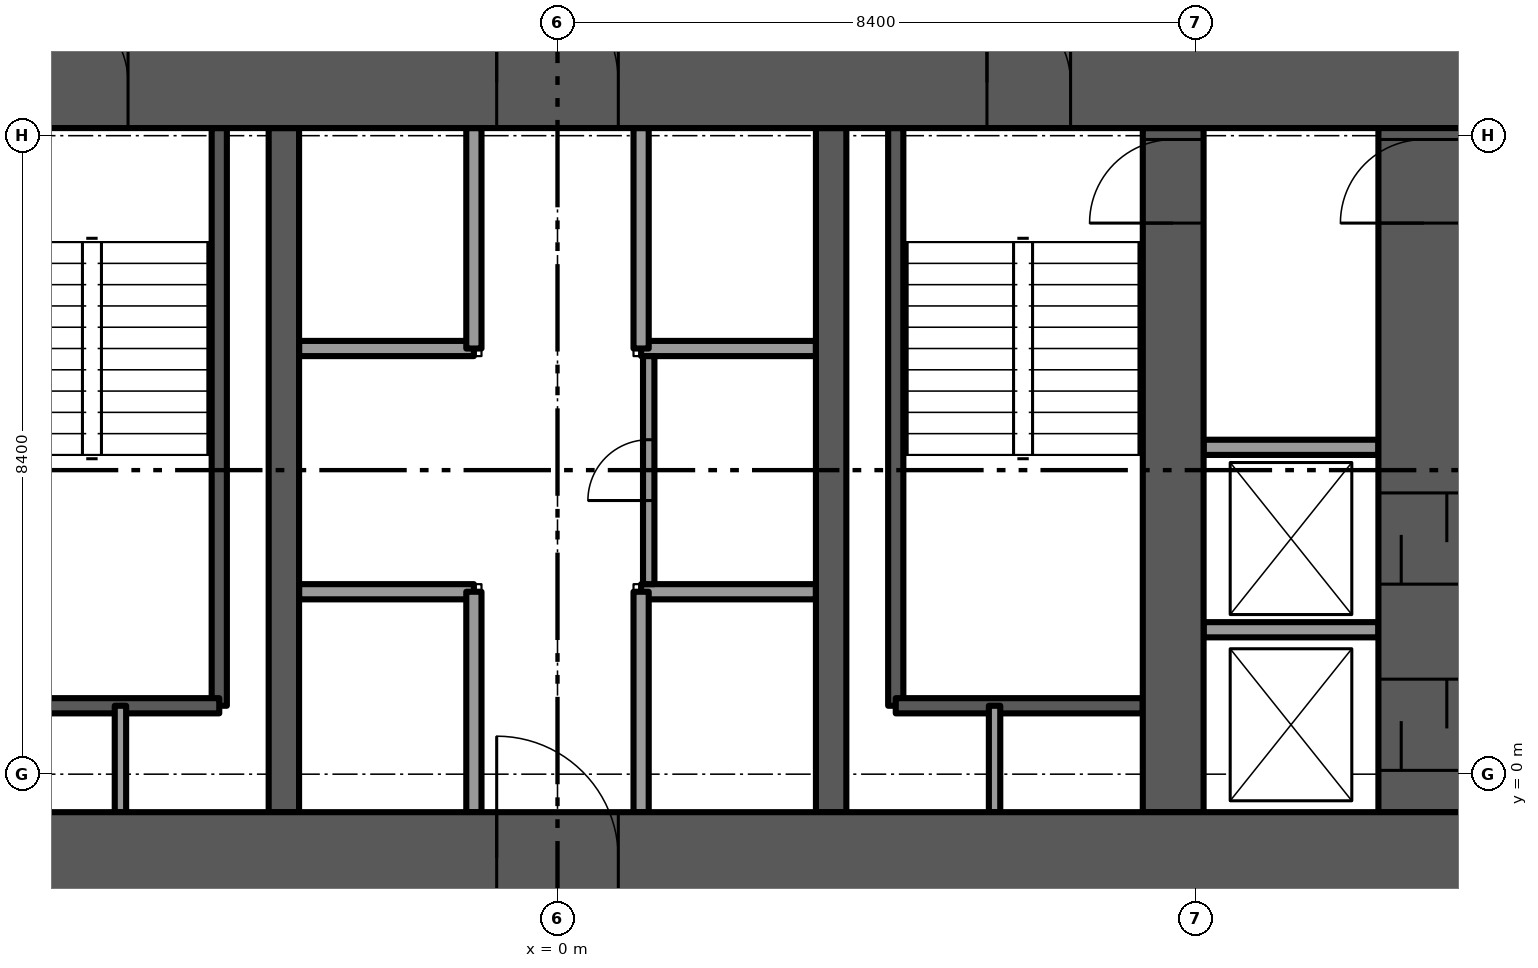
"""IFC4 building model, lengths in metres.
Left out: names, types, materials, properties, quantities, classifications, styles, units other than length and angle.
Written with IfcOpenShell. Run it as: python <this file> out.ifc"""

import sys

from ifc_helpers import new_model, si_unit, direction, frame, frame_2d, origin, place, context, subcontext, project, spatial, rectangle, extrude, element, fill, save


model = new_model("IFC4")
c1 = context("Model", 3, precision=1e-05, world=origin(), true_north=direction((0.0, 1.0)))
c2 = subcontext(c1, "Body", "Model", "MODEL_VIEW")
j1 = project(units=[si_unit("LENGTHUNIT", "METRE"), si_unit("PLANEANGLEUNIT", "RADIAN")], contexts=[c1])
p1 = place(None, origin())
s1 = spatial("IfcSite", under=j1, at=p1, CompositionType="ELEMENT")
p2 = place(p1, origin())
s2 = spatial("IfcBuilding", under=s1, at=p2, CompositionType="ELEMENT")
p3 = place(p2, frame((0.0, 0.0, 28.0)))
s3 = spatial("IfcBuildingStorey", under=s2, at=p3, CompositionType="ELEMENT", Elevation=28.0)
p4 = place(p3, frame((-12.0, -1.1, -0.3), z_axis=(0.0, 0.0, 1.0), x_axis=(1.0, 0.0, 0.0)))
e1 = element("IfcWall", 1, at=p4, inside=s3, PredefinedType="SHEAR", context=c2, shape_type="SweptSolid", body=[
    extrude(rectangle(XDim=24.0, YDim=1.2, at=frame_2d((12.0, 0.0))), origin(), (0.0, 0.0, 1.0), 3.75),
])
p5 = place(p4, frame((11.2, 0.0, 0.0)))
e2 = element("IfcOpeningElement", 2, at=p5, cuts=e1, PredefinedType="OPENING", context=c2, shape_type="SweptSolid", body=[
    extrude(rectangle(XDim=1.6, YDim=2.1, at=frame_2d((0.8, 1.05))), frame((0.0, 0.6, 0.0), z_axis=(0.0, -1.0, 0.0), x_axis=(1.0, 0.0, 0.0)), (0.0, 0.0, 1.0), 1.2),
])
p6 = place(p3, frame((-12.0, 9.1, -0.3), z_axis=(0.0, 0.0, 1.0), x_axis=(1.0, 0.0, 0.0)))
e3 = element("IfcWall", 3, at=p6, inside=s3, PredefinedType="SHEAR", context=c2, shape_type="SweptSolid", body=[
    extrude(rectangle(XDim=24.0, YDim=1.2, at=frame_2d((12.0, 0.0))), origin(), (0.0, 0.0, 1.0), 3.75),
])
p7 = place(p6, frame((11.2, 0.0, 0.0)))
e4 = element("IfcOpeningElement", 4, at=p7, cuts=e3, PredefinedType="OPENING", context=c2, shape_type="SweptSolid", body=[
    extrude(rectangle(XDim=1.6, YDim=2.1, at=frame_2d((0.8, 1.05))), frame((0.0, 0.6, 0.0), z_axis=(0.0, -1.0, 0.0), x_axis=(1.0, 0.0, 0.0)), (0.0, 0.0, 1.0), 1.2),
])
p8 = place(p6, frame((5.25, 0.0, 0.0)))
e5 = element("IfcOpeningElement", 5, at=p8, cuts=e3, PredefinedType="OPENING", context=c2, shape_type="SweptSolid", body=[
    extrude(rectangle(XDim=1.1, YDim=2.1, at=frame_2d((0.55, 1.05))), frame((0.0, 0.6, 0.0), z_axis=(0.0, -1.0, 0.0), x_axis=(1.0, 0.0, 0.0)), (0.0, 0.0, 1.0), 1.2),
])
p9 = place(p6, frame((17.65, 0.0, 0.0)))
e6 = element("IfcOpeningElement", 6, at=p9, cuts=e3, PredefinedType="OPENING", context=c2, shape_type="SweptSolid", body=[
    extrude(rectangle(XDim=1.1, YDim=2.1, at=frame_2d((0.55, 1.05))), frame((0.0, 0.6, 0.0), z_axis=(0.0, -1.0, 0.0), x_axis=(1.0, 0.0, 0.0)), (0.0, 0.0, 1.0), 1.2),
])
p10 = place(p3, frame((8.1, -0.5, -0.3), z_axis=(0.0, 0.0, 1.0), x_axis=(0.0, 1.0, 0.0)))
e7 = element("IfcWall", 7, at=p10, inside=s3, PredefinedType="SHEAR", context=c2, shape_type="SweptSolid", body=[
    extrude(rectangle(XDim=9.0, YDim=0.8, at=frame_2d((4.5, 0.0))), origin(), (0.0, 0.0, 1.0), 3.75),
])
p11 = place(p10, frame((7.75, 0.0, 0.0)))
e8 = element("IfcOpeningElement", 8, at=p11, cuts=e7, PredefinedType="OPENING", context=c2, shape_type="SweptSolid", body=[
    extrude(rectangle(XDim=1.1, YDim=2.1, at=frame_2d((0.55, 1.05))), frame((0.0, 0.4, 0.0), z_axis=(0.0, -1.0, 0.0), x_axis=(1.0, 0.0, 0.0)), (0.0, 0.0, 1.0), 0.8),
])
for number, where, z_axis, x_axis in (
    (9, (-3.6, -0.5, -0.3), (0.0, 0.0, 1.0), (0.0, 1.0, 0.0)),
    (10, (3.6, -0.5, -0.3), (0.0, 0.0, 1.0), (0.0, 1.0, 0.0)),
):
    element("IfcWall", number, at=place(p3, frame(where, z_axis=z_axis, x_axis=x_axis)), inside=s3, PredefinedType="SHEAR", context=c2, shape_type="SweptSolid", body=[
        extrude(rectangle(XDim=9.0, YDim=0.4, at=frame_2d((4.5, 0.0))), origin(), (0.0, 0.0, 1.0), 3.75),
    ])
p12 = place(p3, frame((11.4, -0.5, -0.3), z_axis=(0.0, 0.0, 1.0), x_axis=(0.0, 1.0, 0.0)))
e11 = element("IfcWall", 11, at=p12, inside=s3, PredefinedType="SHEAR", context=c2, shape_type="SweptSolid", body=[
    extrude(rectangle(XDim=9.0, YDim=1.2, at=frame_2d((4.5, 0.0))), origin(), (0.0, 0.0, 1.0), 3.75),
])
p13 = place(p12, frame((7.75, 0.0, 0.0)))
e12 = element("IfcOpeningElement", 12, at=p13, cuts=e11, PredefinedType="OPENING", context=c2, shape_type="SweptSolid", body=[
    extrude(rectangle(XDim=1.1, YDim=2.1, at=frame_2d((0.55, 1.05))), frame((0.0, 0.6, 0.0), z_axis=(0.0, -1.0, 0.0), x_axis=(1.0, 0.0, 0.0)), (0.0, 0.0, 1.0), 1.2),
])
p14 = place(p12, frame((0.55, 0.0, 0.0)))
e13 = element("IfcOpeningElement", 13, at=p14, cuts=e11, PredefinedType="OPENING", context=c2, shape_type="SweptSolid", body=[
    extrude(rectangle(XDim=1.2, YDim=2.1, at=frame_2d((0.6, 1.05))), frame((0.0, 0.6, 0.0), z_axis=(0.0, -1.0, 0.0), x_axis=(1.0, 0.0, 0.0)), (0.0, 0.0, 1.0), 1.2),
])
p15 = place(p12, frame((3.0, 0.0, 0.0)))
e14 = element("IfcOpeningElement", 14, at=p15, cuts=e11, PredefinedType="OPENING", context=c2, shape_type="SweptSolid", body=[
    extrude(rectangle(XDim=1.2, YDim=2.1, at=frame_2d((0.6, 1.05))), frame((0.0, 0.6, 0.0), z_axis=(0.0, -1.0, 0.0), x_axis=(1.0, 0.0, 0.0)), (0.0, 0.0, 1.0), 1.2),
])
p16 = place(p3, frame((10.945, -17.893, 0.0), z_axis=(0.0, 0.0, 1.0), x_axis=(0.500003237297, 0.866023534722, 0.0)))
e15 = element("IfcWall", 15, at=p16, inside=s3, PredefinedType="SOLIDWALL", context=c2, shape_type="SweptSolid", body=[
    extrude(rectangle(XDim=20.046, YDim=0.15, at=frame_2d((10.023, 0.0))), origin(), (0.0, 0.0, 1.0), 3.45),
])
p17 = place(p16, frame((1.923, 0.0, 0.15)))
e16 = element("IfcOpeningElement", 16, at=p17, cuts=e15, PredefinedType="OPENING", context=c2, shape_type="SweptSolid", body=[
    extrude(rectangle(XDim=1.8, YDim=2.85, at=frame_2d((0.9, 1.425))), frame((0.0, 0.075, 0.0), z_axis=(0.0, -1.0, 0.0), x_axis=(1.0, 0.0, 0.0)), (0.0, 0.0, 1.0), 0.15),
])
p18 = place(p16, frame((4.023, 0.0, 0.0)))
e17 = element("IfcOpeningElement", 17, at=p18, cuts=e15, PredefinedType="OPENING", context=c2, shape_type="SweptSolid", body=[
    extrude(rectangle(XDim=1.5, YDim=2.4, at=frame_2d((0.75, 1.2))), frame((0.0, 0.075, 0.0), z_axis=(0.0, -1.0, 0.0), x_axis=(1.0, 0.0, 0.0)), (0.0, 0.0, 1.0), 0.15),
])
p19 = place(p16, frame((6.123, 0.0, 0.15)))
e18 = element("IfcOpeningElement", 18, at=p19, cuts=e15, PredefinedType="OPENING", context=c2, shape_type="SweptSolid", body=[
    extrude(rectangle(XDim=1.8, YDim=2.85, at=frame_2d((0.9, 1.425))), frame((0.0, 0.075, 0.0), z_axis=(0.0, -1.0, 0.0), x_axis=(1.0, 0.0, 0.0)), (0.0, 0.0, 1.0), 0.15),
])
p20 = place(p16, frame((8.223, 0.0, 0.0)))
e19 = element("IfcOpeningElement", 19, at=p20, cuts=e15, PredefinedType="OPENING", context=c2, shape_type="SweptSolid", body=[
    extrude(rectangle(XDim=1.5, YDim=2.4, at=frame_2d((0.75, 1.2))), frame((0.0, 0.075, 0.0), z_axis=(0.0, -1.0, 0.0), x_axis=(1.0, 0.0, 0.0)), (0.0, 0.0, 1.0), 0.15),
])
p21 = place(p16, frame((10.323, 0.0, 0.15)))
e20 = element("IfcOpeningElement", 20, at=p21, cuts=e15, PredefinedType="OPENING", context=c2, shape_type="SweptSolid", body=[
    extrude(rectangle(XDim=1.8, YDim=2.85, at=frame_2d((0.9, 1.425))), frame((0.0, 0.075, 0.0), z_axis=(0.0, -1.0, 0.0), x_axis=(1.0, 0.0, 0.0)), (0.0, 0.0, 1.0), 0.15),
])
p22 = place(p16, frame((12.423, 0.0, 0.0)))
e21 = element("IfcOpeningElement", 21, at=p22, cuts=e15, PredefinedType="OPENING", context=c2, shape_type="SweptSolid", body=[
    extrude(rectangle(XDim=1.5, YDim=2.4, at=frame_2d((0.75, 1.2))), frame((0.0, 0.075, 0.0), z_axis=(0.0, -1.0, 0.0), x_axis=(1.0, 0.0, 0.0)), (0.0, 0.0, 1.0), 0.15),
])
p23 = place(p16, frame((14.523, 0.0, 0.15)))
e22 = element("IfcOpeningElement", 22, at=p23, cuts=e15, PredefinedType="OPENING", context=c2, shape_type="SweptSolid", body=[
    extrude(rectangle(XDim=0.9, YDim=2.85, at=frame_2d((0.45, 1.425))), frame((0.0, 0.075, 0.0), z_axis=(0.0, -1.0, 0.0), x_axis=(1.0, 0.0, 0.0)), (0.0, 0.0, 1.0), 0.15),
])
p24 = place(p16, frame((0.311, 0.0, 0.15)))
e23 = element("IfcOpeningElement", 23, at=p24, cuts=e15, PredefinedType="OPENING", context=c2, shape_type="SweptSolid", body=[
    extrude(rectangle(XDim=0.9, YDim=2.73, at=frame_2d((0.45, 1.365))), frame((0.0, 0.075, 0.0), z_axis=(0.0, -1.0, 0.0), x_axis=(1.0, 0.0, 0.0)), (0.0, 0.0, 1.0), 0.15),
])
p25 = place(p16, frame((18.834, 0.0, 0.15)))
e24 = element("IfcOpeningElement", 24, at=p25, cuts=e15, PredefinedType="OPENING", context=c2, shape_type="SweptSolid", body=[
    extrude(rectangle(XDim=0.9, YDim=2.73, at=frame_2d((0.45, 1.365))), frame((0.0, 0.075, 0.0), z_axis=(0.0, -1.0, 0.0), x_axis=(1.0, 0.0, 0.0)), (0.0, 0.0, 1.0), 0.15),
])
p26 = place(p3, frame((20.968, 0.532, 0.0), z_axis=(0.0, 0.0, 1.0), x_axis=(-0.500000010132, 0.866025397935, 0.0)))
e25 = element("IfcWall", 25, at=p26, inside=s3, PredefinedType="SOLIDWALL", context=c2, shape_type="SweptSolid", body=[
    extrude(rectangle(XDim=22.817, YDim=0.15, at=frame_2d((11.408, 0.0))), origin(), (0.0, 0.0, 1.0), 3.45),
])
p27 = place(p26, frame((5.136, 0.0, 0.15)))
e26 = element("IfcOpeningElement", 26, at=p27, cuts=e25, PredefinedType="OPENING", context=c2, shape_type="SweptSolid", body=[
    extrude(rectangle(XDim=0.9, YDim=2.85, at=frame_2d((0.45, 1.425))), frame((0.0, 0.075, 0.0), z_axis=(0.0, -1.0, 0.0), x_axis=(1.0, 0.0, 0.0)), (0.0, 0.0, 1.0), 0.15),
])
p28 = place(p26, frame((6.123, 0.0, 0.0)))
e27 = element("IfcOpeningElement", 27, at=p28, cuts=e25, PredefinedType="OPENING", context=c2, shape_type="SweptSolid", body=[
    extrude(rectangle(XDim=1.5, YDim=2.4, at=frame_2d((0.75, 1.2))), frame((0.0, 0.075, 0.0), z_axis=(0.0, -1.0, 0.0), x_axis=(1.0, 0.0, 0.0)), (0.0, 0.0, 1.0), 0.15),
])
p29 = place(p26, frame((8.223, 0.0, 0.15)))
e28 = element("IfcOpeningElement", 28, at=p29, cuts=e25, PredefinedType="OPENING", context=c2, shape_type="SweptSolid", body=[
    extrude(rectangle(XDim=0.9, YDim=2.85, at=frame_2d((0.45, 1.425))), frame((0.0, 0.075, 0.0), z_axis=(0.0, -1.0, 0.0), x_axis=(1.0, 0.0, 0.0)), (0.0, 0.0, 1.0), 0.15),
])
p30 = place(p26, frame((10.323, 0.0, 0.15)))
e29 = element("IfcOpeningElement", 29, at=p30, cuts=e25, PredefinedType="OPENING", context=c2, shape_type="SweptSolid", body=[
    extrude(rectangle(XDim=1.5, YDim=2.85, at=frame_2d((0.75, 1.425))), frame((0.0, 0.075, 0.0), z_axis=(0.0, -1.0, 0.0), x_axis=(1.0, 0.0, 0.0)), (0.0, 0.0, 1.0), 0.15),
])
p31 = place(p26, frame((14.764, 0.0, 0.15)))
e30 = element("IfcOpeningElement", 30, at=p31, cuts=e25, PredefinedType="OPENING", context=c2, shape_type="SweptSolid", body=[
    extrude(rectangle(XDim=0.9, YDim=2.85, at=frame_2d((0.45, 1.425))), frame((0.0, 0.075, 0.0), z_axis=(0.0, -1.0, 0.0), x_axis=(1.0, 0.0, 0.0)), (0.0, 0.0, 1.0), 0.15),
])
p32 = place(p26, frame((12.564, 0.0, 0.15)))
e31 = element("IfcOpeningElement", 31, at=p32, cuts=e25, PredefinedType="OPENING", context=c2, shape_type="SweptSolid", body=[
    extrude(rectangle(XDim=1.5, YDim=2.85, at=frame_2d((0.75, 1.425))), frame((0.0, 0.075, 0.0), z_axis=(0.0, -1.0, 0.0), x_axis=(1.0, 0.0, 0.0)), (0.0, 0.0, 1.0), 0.15),
])
p33 = place(p26, frame((18.294, 0.0, 0.15)))
e32 = element("IfcOpeningElement", 32, at=p33, cuts=e25, PredefinedType="OPENING", context=c2, shape_type="SweptSolid", body=[
    extrude(rectangle(XDim=1.5, YDim=2.85, at=frame_2d((0.75, 1.425))), frame((0.0, 0.075, 0.0), z_axis=(0.0, -1.0, 0.0), x_axis=(1.0, 0.0, 0.0)), (0.0, 0.0, 1.0), 0.15),
])
p34 = place(p26, frame((0.993, 0.0, 0.15)))
e33 = element("IfcOpeningElement", 33, at=p34, cuts=e25, PredefinedType="OPENING", context=c2, shape_type="SweptSolid", body=[
    extrude(rectangle(XDim=1.8, YDim=2.73, at=frame_2d((0.9, 1.365))), frame((0.0, 0.075, 0.0), z_axis=(0.0, -1.0, 0.0), x_axis=(1.0, 0.0, 0.0)), (0.0, 0.0, 1.0), 0.15),
])
p35 = place(p26, frame((20.82, 0.0, 0.15)))
e34 = element("IfcOpeningElement", 34, at=p35, cuts=e25, PredefinedType="OPENING", context=c2, shape_type="SweptSolid", body=[
    extrude(rectangle(XDim=1.8, YDim=2.73, at=frame_2d((0.9, 1.365))), frame((0.0, 0.075, 0.0), z_axis=(0.0, -1.0, 0.0), x_axis=(1.0, 0.0, 0.0)), (0.0, 0.0, 1.0), 0.15),
])
for number, where, z_axis, x_axis in (
    (35, (-3.4, 2.4, 0.0), (0.0, 0.0, 1.0), (1.0, 0.0, 0.0)),
    (36, (-3.4, 5.6, 0.0), (0.0, 0.0, 1.0), (1.0, 0.0, 0.0)),
    (37, (1.1, 2.4, 0.0), (0.0, 0.0, 1.0), (1.0, 0.0, 0.0)),
    (38, (1.1, 5.6, 0.0), (0.0, 0.0, 1.0), (1.0, 0.0, 0.0)),
):
    element("IfcWall", number, at=place(p3, frame(where, z_axis=z_axis, x_axis=x_axis)), inside=s3, PredefinedType="PARTITIONING", context=c2, shape_type="SweptSolid", body=[
        extrude(rectangle(XDim=2.3, YDim=0.2, at=frame_2d((1.15, 0.0))), origin(), (0.0, 0.0, 1.0), 3.45),
    ])
for number, where, z_axis, x_axis in (
    (39, (-1.1, -0.5, 0.0), (0.0, 0.0, 1.0), (0.0, 1.0, 0.0)),
    (40, (1.1, -0.5, 0.0), (0.0, 0.0, 1.0), (0.0, 1.0, 0.0)),
    (41, (-1.1, 5.6, 0.0), (0.0, 0.0, 1.0), (0.0, 1.0, 0.0)),
    (42, (1.1, 5.6, 0.0), (0.0, 0.0, 1.0), (0.0, 1.0, 0.0)),
):
    element("IfcWall", number, at=place(p3, frame(where, z_axis=z_axis, x_axis=x_axis)), inside=s3, PredefinedType="PARTITIONING", context=c2, shape_type="SweptSolid", body=[
        extrude(rectangle(XDim=2.9, YDim=0.2, at=frame_2d((1.45, 0.0))), origin(), (0.0, 0.0, 1.0), 3.45),
    ])
p36 = place(p3, frame((-4.45, 0.9, -0.3), z_axis=(0.0, 0.0, 1.0), x_axis=(0.0, 1.0, 0.0)))
e43 = element("IfcWall", 43, at=p36, inside=s3, PredefinedType="SOLIDWALL", context=c2, shape_type="SweptSolid", body=[
    extrude(rectangle(XDim=7.6, YDim=0.2, at=frame_2d((3.8, 0.0))), origin(), (0.0, 0.0, 1.0), 3.75),
])
p37 = place(p3, frame((-7.7, 0.9, -0.3), z_axis=(0.0, 0.0, 1.0), x_axis=(1.0, 0.0, 0.0)))
e44 = element("IfcWall", 44, at=p37, inside=s3, PredefinedType="SOLIDWALL", context=c2, shape_type="SweptSolid", body=[
    extrude(rectangle(XDim=3.25, YDim=0.2, at=frame_2d((1.625, 0.0))), origin(), (0.0, 0.0, 1.0), 3.75),
])
p38 = place(p3, frame((-5.75, -0.5, 0.0), z_axis=(0.0, 0.0, 1.0), x_axis=(0.0, 1.0, 0.0)))
e45 = element("IfcWall", 45, at=p38, inside=s3, PredefinedType="PARTITIONING", context=c2, shape_type="SweptSolid", body=[
    extrude(rectangle(XDim=1.4, YDim=0.15, at=frame_2d((0.7, 0.0))), origin(), (0.0, 0.0, 1.0), 3.45),
])
p39 = place(p3, frame((4.45, 0.9, -0.3), z_axis=(0.0, 0.0, 1.0), x_axis=(0.0, 1.0, 0.0)))
e46 = element("IfcWall", 46, at=p39, inside=s3, PredefinedType="SOLIDWALL", context=c2, shape_type="SweptSolid", body=[
    extrude(rectangle(XDim=7.6, YDim=0.2, at=frame_2d((3.8, 0.0))), origin(), (0.0, 0.0, 1.0), 3.75),
])
p40 = place(p3, frame((4.45, 0.9, -0.3), z_axis=(0.0, 0.0, 1.0), x_axis=(1.0, 0.0, 0.0)))
e47 = element("IfcWall", 47, at=p40, inside=s3, PredefinedType="SOLIDWALL", context=c2, shape_type="SweptSolid", body=[
    extrude(rectangle(XDim=3.25, YDim=0.2, at=frame_2d((1.625, 0.0))), origin(), (0.0, 0.0, 1.0), 3.75),
])
p41 = place(p3, frame((5.75, -0.5, 0.0), z_axis=(0.0, 0.0, 1.0), x_axis=(0.0, 1.0, 0.0)))
e48 = element("IfcWall", 48, at=p41, inside=s3, PredefinedType="PARTITIONING", context=c2, shape_type="SweptSolid", body=[
    extrude(rectangle(XDim=1.4, YDim=0.15, at=frame_2d((0.7, 0.0))), origin(), (0.0, 0.0, 1.0), 3.45),
])
p42 = place(p3, frame((1.2, 2.5, 0.0), z_axis=(0.0, 0.0, 1.0), x_axis=(0.0, 1.0, 0.0)))
e49 = element("IfcWall", 49, at=p42, inside=s3, PredefinedType="PARTITIONING", context=c2, shape_type="SweptSolid", body=[
    extrude(rectangle(XDim=3.0, YDim=0.15, at=frame_2d((1.5, 0.0))), origin(), (0.0, 0.0, 1.0), 3.45),
])
p43 = place(p42, frame((1.1, 0.0, 0.0)))
e50 = element("IfcOpeningElement", 50, at=p43, cuts=e49, PredefinedType="OPENING", context=c2, shape_type="SweptSolid", body=[
    extrude(rectangle(XDim=0.8, YDim=2.1, at=frame_2d((0.4, 1.05))), frame((0.0, 0.075, 0.0), z_axis=(0.0, -1.0, 0.0), x_axis=(1.0, 0.0, 0.0)), (0.0, 0.0, 1.0), 0.15),
])
for number, where, z_axis, x_axis in (
    (51, (8.5, 1.9, 0.0), (0.0, 0.0, 1.0), (1.0, 0.0, 0.0)),
    (52, (8.5, 4.3, 0.0), (0.0, 0.0, 1.0), (1.0, 0.0, 0.0)),
):
    element("IfcWall", number, at=place(p3, frame(where, z_axis=z_axis, x_axis=x_axis)), inside=s3, PredefinedType="PARTITIONING", context=c2, shape_type="SweptSolid", body=[
        extrude(rectangle(XDim=2.3, YDim=0.2, at=frame_2d((1.15, 0.0))), origin(), (0.0, 0.0, 1.0), 3.45),
    ])
p44 = place(p5, origin())
e53 = element("IfcDoor", 53, at=p44, inside=s3, OperationType="DOUBLE_DOOR_SINGLE_SWING", PredefinedType="DOOR", context=c2, shape_type="SweptSolid", body=[
    extrude(rectangle(XDim=1.6, YDim=2.1, at=frame_2d((0.8, 1.05))), frame((0.0, 0.025, 0.0), z_axis=(0.0, -1.0, 0.0), x_axis=(1.0, 0.0, 0.0)), (0.0, 0.0, 1.0), 0.05),
])
fill(e2, e53)
p45 = place(p7, origin())
e54 = element("IfcDoor", 54, at=p45, inside=s3, OperationType="DOUBLE_DOOR_SINGLE_SWING", PredefinedType="DOOR", context=c2, shape_type="SweptSolid", body=[
    extrude(rectangle(XDim=1.6, YDim=2.1, at=frame_2d((0.8, 1.05))), frame((0.0, 0.025, 0.0), z_axis=(0.0, -1.0, 0.0), x_axis=(1.0, 0.0, 0.0)), (0.0, 0.0, 1.0), 0.05),
])
fill(e4, e54)
p46 = place(p8, origin())
e55 = element("IfcDoor", 55, at=p46, inside=s3, OperationType="SINGLE_SWING_LEFT", PredefinedType="DOOR", context=c2, shape_type="SweptSolid", body=[
    extrude(rectangle(XDim=1.1, YDim=2.1, at=frame_2d((0.55, 1.05))), frame((0.0, 0.025, 0.0), z_axis=(0.0, -1.0, 0.0), x_axis=(1.0, 0.0, 0.0)), (0.0, 0.0, 1.0), 0.05),
])
fill(e5, e55)
p47 = place(p9, origin())
e56 = element("IfcDoor", 56, at=p47, inside=s3, OperationType="SINGLE_SWING_RIGHT", PredefinedType="DOOR", context=c2, shape_type="SweptSolid", body=[
    extrude(rectangle(XDim=1.1, YDim=2.1, at=frame_2d((0.55, 1.05))), frame((0.0, 0.025, 0.0), z_axis=(0.0, -1.0, 0.0), x_axis=(1.0, 0.0, 0.0)), (0.0, 0.0, 1.0), 0.05),
])
fill(e6, e56)
p48 = place(p11, origin())
e57 = element("IfcDoor", 57, at=p48, inside=s3, OperationType="SINGLE_SWING_LEFT", PredefinedType="DOOR", context=c2, shape_type="SweptSolid", body=[
    extrude(rectangle(XDim=1.1, YDim=2.1, at=frame_2d((0.55, 1.05))), frame((0.0, 0.025, 0.0), z_axis=(0.0, -1.0, 0.0), x_axis=(1.0, 0.0, 0.0)), (0.0, 0.0, 1.0), 0.05),
])
fill(e8, e57)
p49 = place(p43, origin())
e58 = element("IfcDoor", 58, at=p49, inside=s3, OperationType="SINGLE_SWING_RIGHT", PredefinedType="DOOR", context=c2, shape_type="SweptSolid", body=[
    extrude(rectangle(XDim=0.8, YDim=2.1, at=frame_2d((0.4, 1.05))), frame((0.0, 0.025, 0.0), z_axis=(0.0, -1.0, 0.0), x_axis=(1.0, 0.0, 0.0)), (0.0, 0.0, 1.0), 0.05),
])
fill(e50, e58)
p50 = place(p13, origin())
e59 = element("IfcDoor", 59, at=p50, inside=s3, OperationType="SINGLE_SWING_RIGHT", PredefinedType="DOOR", context=c2, shape_type="SweptSolid", body=[
    extrude(rectangle(XDim=1.1, YDim=2.1, at=frame_2d((0.55, 1.05))), frame((0.0, 0.025, 0.0), z_axis=(0.0, -1.0, 0.0), x_axis=(1.0, 0.0, 0.0)), (0.0, 0.0, 1.0), 0.05),
])
fill(e12, e59)
p51 = place(p14, origin())
e60 = element("IfcDoor", 60, at=p51, inside=s3, OperationType="SLIDING_TO_LEFT", PredefinedType="DOOR", context=c2, shape_type="SweptSolid", body=[
    extrude(rectangle(XDim=1.2, YDim=2.1, at=frame_2d((0.6, 1.05))), frame((0.0, 0.025, 0.0), z_axis=(0.0, -1.0, 0.0), x_axis=(1.0, 0.0, 0.0)), (0.0, 0.0, 1.0), 0.05),
])
fill(e13, e60)
p52 = place(p15, origin())
e61 = element("IfcDoor", 61, at=p52, inside=s3, OperationType="SLIDING_TO_LEFT", PredefinedType="DOOR", context=c2, shape_type="SweptSolid", body=[
    extrude(rectangle(XDim=1.2, YDim=2.1, at=frame_2d((0.6, 1.05))), frame((0.0, 0.025, 0.0), z_axis=(0.0, -1.0, 0.0), x_axis=(1.0, 0.0, 0.0)), (0.0, 0.0, 1.0), 0.05),
])
fill(e14, e61)
save(model, sys.argv[1])
